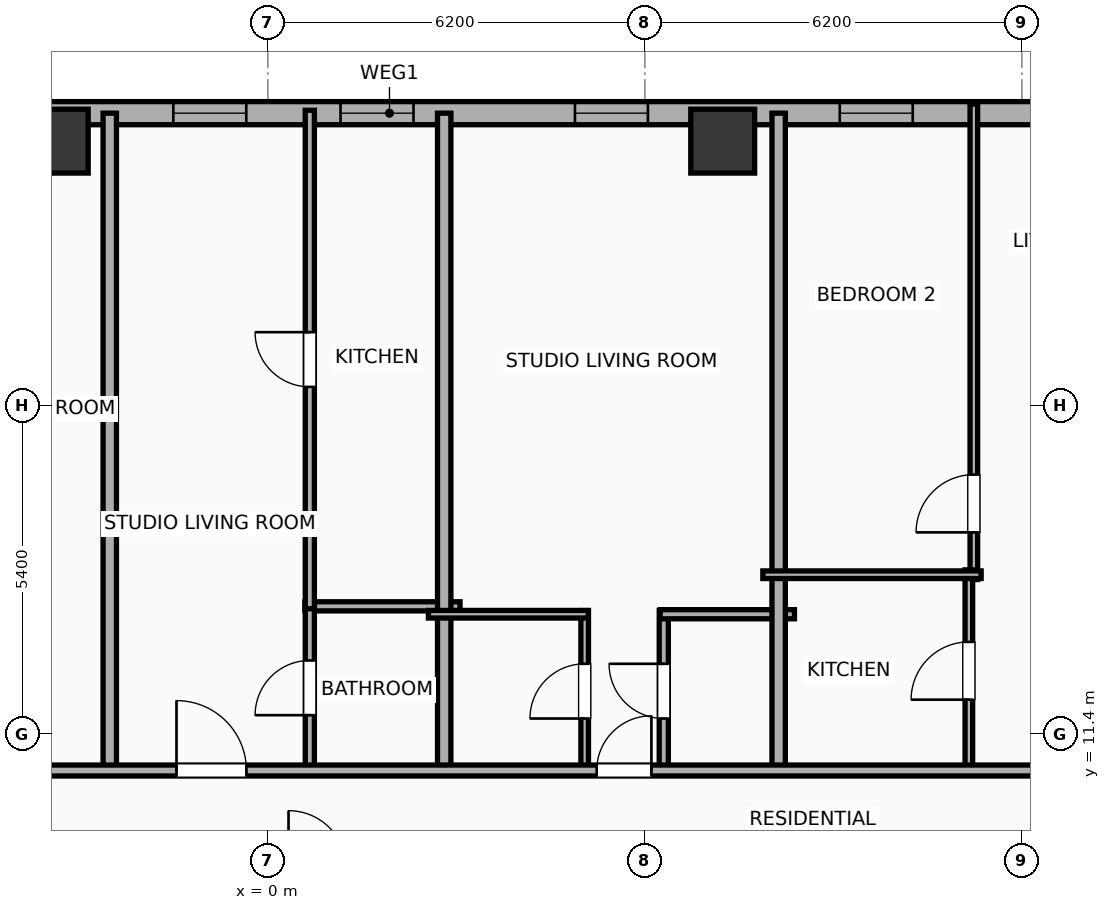
"""IFC4 building model, lengths in metres.
Left out: names, types, materials, properties, quantities, classifications, styles, units other than length and angle.
Written with IfcOpenShell. Run it as: python <this file> out.ifc"""

import sys

from ifc_helpers import new_model, si_unit, direction, frame, frame_2d, origin, origin_2d, place, context, subcontext, project, spatial, rectangle, hollow_rectangle, extrude, element, fill, save


model = new_model("IFC4")
c1 = context("Model", 3, precision=1e-05, world=origin(), true_north=direction((0.0, 1.0)))
c2 = subcontext(c1, "Body", "Model", "MODEL_VIEW")
j1 = project(units=[si_unit("LENGTHUNIT", "METRE"), si_unit("PLANEANGLEUNIT", "RADIAN")], contexts=[c1])
p1 = place(None, origin())
s1 = spatial("IfcSite", under=j1, at=p1, CompositionType="ELEMENT")
p2 = place(p1, origin())
s2 = spatial("IfcBuilding", under=s1, at=p2, CompositionType="ELEMENT")
p3 = place(p2, frame((0.0, 0.0, 109.2)))
s3 = spatial("IfcBuildingStorey", under=s2, at=p3, CompositionType="ELEMENT", Elevation=109.2)
for number, where, z_axis, x_axis in (
    (1, (7.48, 21.15, 0.0), (0.0, 0.0, 1.0), (1.0, 0.0, 0.0)),
    (2, (-3.48, 21.15, 0.0), (0.0, 0.0, 1.0), (1.0, 0.0, 0.0)),
):
    element("IfcColumn", number, at=place(p3, frame(where, z_axis=z_axis, x_axis=x_axis)), inside=s3, PredefinedType="COLUMN", context=c2, shape_type="SweptSolid", body=[
        extrude(hollow_rectangle(XDim=1.05, YDim=1.05, WallThickness=0.036, at=origin_2d()), origin(), (0.0, 0.0, 1.0), 3.9),
    ])
p4 = place(p3, frame((-25.381, 21.61, 0.0), z_axis=(0.0, 0.0, 1.0), x_axis=(1.0, 0.0, 0.0)))
e3 = element("IfcWall", 3, at=p4, inside=s3, PredefinedType="ELEMENTEDWALL", context=c2, shape_type="SweptSolid", body=[
    extrude(rectangle(XDim=54.763, YDim=0.38, at=frame_2d((27.381, 0.0))), origin(), (0.0, 0.0, 1.0), 3.65),
])
p5 = place(p4, frame((5.645, 0.0, 0.75)))
e4 = element("IfcOpeningElement", 4, at=p5, cuts=e3, PredefinedType="OPENING", context=c2, shape_type="SweptSolid", body=[
    extrude(rectangle(XDim=2.4, YDim=2.1, at=frame_2d((1.2, 1.05))), frame((0.0, 0.2, 0.0), z_axis=(0.0, -1.0, 0.0), x_axis=(1.0, 0.0, 0.0)), (0.0, 0.0, 1.0), 0.4),
])
p6 = place(p4, frame((45.067, 0.0, 0.75)))
e5 = element("IfcOpeningElement", 5, at=p6, cuts=e3, PredefinedType="OPENING", context=c2, shape_type="SweptSolid", body=[
    extrude(rectangle(XDim=2.4, YDim=2.1, at=frame_2d((1.2, 1.05))), frame((0.0, 0.2, 0.0), z_axis=(0.0, -1.0, 0.0), x_axis=(1.0, 0.0, 0.0)), (0.0, 0.0, 1.0), 0.4),
])
p7 = place(p4, frame((1.831, 0.0, 0.75)))
e6 = element("IfcOpeningElement", 6, at=p7, cuts=e3, PredefinedType="OPENING", context=c2, shape_type="SweptSolid", body=[
    extrude(rectangle(XDim=1.2, YDim=2.05, at=frame_2d((0.6, 1.025))), frame((0.0, 0.2, 0.0), z_axis=(0.0, -1.0, 0.0), x_axis=(1.0, 0.0, 0.0)), (0.0, 0.0, 1.0), 0.4),
])
p8 = place(p4, frame((8.996, 0.0, 0.75)))
e7 = element("IfcOpeningElement", 7, at=p8, cuts=e3, PredefinedType="OPENING", context=c2, shape_type="SweptSolid", body=[
    extrude(rectangle(XDim=1.2, YDim=2.05, at=frame_2d((0.6, 1.025))), frame((0.0, 0.2, 0.0), z_axis=(0.0, -1.0, 0.0), x_axis=(1.0, 0.0, 0.0)), (0.0, 0.0, 1.0), 0.4),
])
p9 = place(p4, frame((15.102, 0.0, 0.75)))
e8 = element("IfcOpeningElement", 8, at=p9, cuts=e3, PredefinedType="OPENING", context=c2, shape_type="SweptSolid", body=[
    extrude(rectangle(XDim=1.2, YDim=2.05, at=frame_2d((0.6, 1.025))), frame((0.0, 0.2, 0.0), z_axis=(0.0, -1.0, 0.0), x_axis=(1.0, 0.0, 0.0)), (0.0, 0.0, 1.0), 0.4),
])
p10 = place(p4, frame((12.352, 0.0, 0.75)))
e9 = element("IfcOpeningElement", 9, at=p10, cuts=e3, PredefinedType="OPENING", context=c2, shape_type="SweptSolid", body=[
    extrude(rectangle(XDim=1.2, YDim=2.05, at=frame_2d((0.6, 1.025))), frame((0.0, 0.2, 0.0), z_axis=(0.0, -1.0, 0.0), x_axis=(1.0, 0.0, 0.0)), (0.0, 0.0, 1.0), 0.4),
])
p11 = place(p4, frame((19.936, 0.0, 0.75)))
e10 = element("IfcOpeningElement", 10, at=p11, cuts=e3, PredefinedType="OPENING", context=c2, shape_type="SweptSolid", body=[
    extrude(rectangle(XDim=1.2, YDim=2.05, at=frame_2d((0.6, 1.025))), frame((0.0, 0.2, 0.0), z_axis=(0.0, -1.0, 0.0), x_axis=(1.0, 0.0, 0.0)), (0.0, 0.0, 1.0), 0.4),
])
p12 = place(p4, frame((17.786, 0.0, 0.75)))
e11 = element("IfcOpeningElement", 11, at=p12, cuts=e3, PredefinedType="OPENING", context=c2, shape_type="SweptSolid", body=[
    extrude(rectangle(XDim=1.2, YDim=2.05, at=frame_2d((0.6, 1.025))), frame((0.0, 0.2, 0.0), z_axis=(0.0, -1.0, 0.0), x_axis=(1.0, 0.0, 0.0)), (0.0, 0.0, 1.0), 0.4),
])
p13 = place(p4, frame((23.826, 0.0, 0.75)))
e12 = element("IfcOpeningElement", 12, at=p13, cuts=e3, PredefinedType="OPENING", context=c2, shape_type="SweptSolid", body=[
    extrude(rectangle(XDim=1.2, YDim=2.05, at=frame_2d((0.6, 1.025))), frame((0.0, 0.2, 0.0), z_axis=(0.0, -1.0, 0.0), x_axis=(1.0, 0.0, 0.0)), (0.0, 0.0, 1.0), 0.4),
])
p14 = place(p4, frame((26.576, 0.0, 0.75)))
e13 = element("IfcOpeningElement", 13, at=p14, cuts=e3, PredefinedType="OPENING", context=c2, shape_type="SweptSolid", body=[
    extrude(rectangle(XDim=1.2, YDim=2.05, at=frame_2d((0.6, 1.025))), frame((0.0, 0.2, 0.0), z_axis=(0.0, -1.0, 0.0), x_axis=(1.0, 0.0, 0.0)), (0.0, 0.0, 1.0), 0.4),
])
p15 = place(p4, frame((30.431, 0.0, 0.75)))
e14 = element("IfcOpeningElement", 14, at=p15, cuts=e3, PredefinedType="OPENING", context=c2, shape_type="SweptSolid", body=[
    extrude(rectangle(XDim=1.2, YDim=2.05, at=frame_2d((0.6, 1.025))), frame((0.0, 0.2, 0.0), z_axis=(0.0, -1.0, 0.0), x_axis=(1.0, 0.0, 0.0)), (0.0, 0.0, 1.0), 0.4),
])
p16 = place(p4, frame((38.581, 0.0, 0.75)))
e15 = element("IfcOpeningElement", 15, at=p16, cuts=e3, PredefinedType="OPENING", context=c2, shape_type="SweptSolid", body=[
    extrude(rectangle(XDim=1.2, YDim=2.05, at=frame_2d((0.6, 1.025))), frame((0.0, 0.2, 0.0), z_axis=(0.0, -1.0, 0.0), x_axis=(1.0, 0.0, 0.0)), (0.0, 0.0, 1.0), 0.4),
])
p17 = place(p4, frame((34.786, 0.0, 0.75)))
e16 = element("IfcOpeningElement", 16, at=p17, cuts=e3, PredefinedType="OPENING", context=c2, shape_type="SweptSolid", body=[
    extrude(rectangle(XDim=1.2, YDim=2.05, at=frame_2d((0.6, 1.025))), frame((0.0, 0.2, 0.0), z_axis=(0.0, -1.0, 0.0), x_axis=(1.0, 0.0, 0.0)), (0.0, 0.0, 1.0), 0.4),
])
p18 = place(p4, frame((41.876, 0.0, 0.75)))
e17 = element("IfcOpeningElement", 17, at=p18, cuts=e3, PredefinedType="OPENING", context=c2, shape_type="SweptSolid", body=[
    extrude(rectangle(XDim=1.2, YDim=2.05, at=frame_2d((0.6, 1.025))), frame((0.0, 0.2, 0.0), z_axis=(0.0, -1.0, 0.0), x_axis=(1.0, 0.0, 0.0)), (0.0, 0.0, 1.0), 0.4),
])
p19 = place(p4, frame((49.385, 0.0, 0.75)))
e18 = element("IfcOpeningElement", 18, at=p19, cuts=e3, PredefinedType="OPENING", context=c2, shape_type="SweptSolid", body=[
    extrude(rectangle(XDim=1.2, YDim=2.05, at=frame_2d((0.6, 1.025))), frame((0.0, 0.2, 0.0), z_axis=(0.0, -1.0, 0.0), x_axis=(1.0, 0.0, 0.0)), (0.0, 0.0, 1.0), 0.4),
])
p20 = place(p4, frame((52.181, 0.0, 0.75)))
e19 = element("IfcOpeningElement", 19, at=p20, cuts=e3, PredefinedType="OPENING", context=c2, shape_type="SweptSolid", body=[
    extrude(rectangle(XDim=1.2, YDim=2.05, at=frame_2d((0.6, 1.025))), frame((0.0, 0.2, 0.0), z_axis=(0.0, -1.0, 0.0), x_axis=(1.0, 0.0, 0.0)), (0.0, 0.0, 1.0), 0.4),
])
p21 = place(p3, frame((-2.6, 10.72, 0.0), z_axis=(0.0, 0.0, 1.0), x_axis=(0.0, 1.0, 0.0)))
e20 = element("IfcWall", 20, at=p21, inside=s3, PredefinedType="PARTITIONING", context=c2, shape_type="SweptSolid", body=[
    extrude(rectangle(XDim=10.89, YDim=0.22, at=frame_2d((5.445, 0.0))), origin(), (0.0, 0.0, 1.0), 3.65),
])
p22 = place(p3, frame((0.61, 13.5, 0.0), z_axis=(0.0, 0.0, 1.0), x_axis=(1.0, 0.0, 0.0)))
e21 = element("IfcWall", 21, at=p22, inside=s3, PredefinedType="PLUMBINGWALL", context=c2, shape_type="SweptSolid", body=[
    extrude(rectangle(XDim=2.55, YDim=0.15, at=frame_2d((1.275, 0.0))), origin(), (0.0, 0.0, 1.0), 3.65),
])
p23 = place(p3, frame((0.69, 10.78, 0.0), z_axis=(0.0, 0.0, 1.0), x_axis=(0.0, 1.0, 0.0)))
e22 = element("IfcWall", 22, at=p23, inside=s3, PredefinedType="PLUMBINGWALL", context=c2, shape_type="SweptSolid", body=[
    extrude(rectangle(XDim=2.76, YDim=0.15, at=frame_2d((1.38, 0.0))), origin(), (0.0, 0.0, 1.0), 3.65),
])
p24 = place(p23, frame((0.93, 0.0, 0.0)))
e23 = element("IfcOpeningElement", 23, at=p24, cuts=e22, PredefinedType="OPENING", context=c2, shape_type="SweptSolid", body=[
    extrude(rectangle(XDim=0.9, YDim=2.05, at=frame_2d((0.45, 1.025))), frame((0.0, 0.085, 0.0), z_axis=(0.0, -1.0, 0.0), x_axis=(1.0, 0.0, 0.0)), (0.0, 0.0, 1.0), 0.17),
])
p25 = place(p3, frame((0.69, 13.46, 0.0), z_axis=(0.0, 0.0, 1.0), x_axis=(0.0, 1.0, 0.0)))
e24 = element("IfcWall", 24, at=p25, inside=s3, PredefinedType="PLUMBINGWALL", context=c2, shape_type="SweptSolid", body=[
    extrude(rectangle(XDim=8.198, YDim=0.15, at=frame_2d((4.099, 0.0))), origin(), (0.0, 0.0, 1.0), 3.65),
])
p26 = place(p25, frame((3.649, 0.0, 0.0)))
e25 = element("IfcOpeningElement", 25, at=p26, cuts=e24, PredefinedType="OPENING", context=c2, shape_type="SweptSolid", body=[
    extrude(rectangle(XDim=0.9, YDim=2.05, at=frame_2d((0.45, 1.025))), frame((0.0, 0.085, 0.0), z_axis=(0.0, -1.0, 0.0), x_axis=(1.0, 0.0, 0.0)), (0.0, 0.0, 1.0), 0.17),
])
p27 = place(p3, frame((2.9, 10.72, 0.0), z_axis=(0.0, 0.0, 1.0), x_axis=(0.0, 1.0, 0.0)))
e26 = element("IfcWall", 26, at=p27, inside=s3, PredefinedType="PARTITIONING", context=c2, shape_type="SweptSolid", body=[
    extrude(rectangle(XDim=10.89, YDim=0.22, at=frame_2d((5.445, 0.0))), origin(), (0.0, 0.0, 1.0), 3.65),
])
p28 = place(p3, frame((5.21, 10.78, 0.0), z_axis=(0.0, 0.0, 1.0), x_axis=(0.0, 1.0, 0.0)))
e27 = element("IfcWall", 27, at=p28, inside=s3, PredefinedType="PARTITIONING", context=c2, shape_type="SweptSolid", body=[
    extrude(rectangle(XDim=2.65, YDim=0.125, at=frame_2d((1.325, 0.0))), origin(), (0.0, 0.0, 1.0), 3.04),
])
p29 = place(p28, frame((0.875, 0.0, 0.0)))
e28 = element("IfcOpeningElement", 28, at=p29, cuts=e27, PredefinedType="OPENING", context=c2, shape_type="SweptSolid", body=[
    extrude(rectangle(XDim=0.9, YDim=2.05, at=frame_2d((0.45, 1.025))), frame((0.0, 0.073, 0.0), z_axis=(0.0, -1.0, 0.0), x_axis=(1.0, 0.0, 0.0)), (0.0, 0.0, 1.0), 0.145),
])
p30 = place(p3, frame((6.511, 10.78, 0.0), z_axis=(0.0, 0.0, 1.0), x_axis=(0.0, 1.0, 0.0)))
e29 = element("IfcWall", 29, at=p30, inside=s3, PredefinedType="PLUMBINGWALL", context=c2, shape_type="SweptSolid", body=[
    extrude(rectangle(XDim=2.65, YDim=0.15, at=frame_2d((1.325, 0.0))), origin(), (0.0, 0.0, 1.0), 3.65),
])
p31 = place(p30, frame((0.875, 0.0, 0.0)))
e30 = element("IfcOpeningElement", 30, at=p31, cuts=e29, PredefinedType="OPENING", context=c2, shape_type="SweptSolid", body=[
    extrude(rectangle(XDim=0.9, YDim=2.05, at=frame_2d((0.45, 1.025))), frame((0.0, 0.085, 0.0), z_axis=(0.0, -1.0, 0.0), x_axis=(1.0, 0.0, 0.0)), (0.0, 0.0, 1.0), 0.17),
])
p32 = place(p3, frame((2.64, 13.37, 0.0), z_axis=(0.0, 0.0, 1.0), x_axis=(1.0, 0.0, 0.0)))
e31 = element("IfcWall", 31, at=p32, inside=s3, PredefinedType="PARTITIONING", context=c2, shape_type="SweptSolid", body=[
    extrude(rectangle(XDim=2.63, YDim=0.125, at=frame_2d((1.315, 0.0))), origin(), (0.0, 0.0, 1.0), 3.65),
])
p33 = place(p3, frame((6.451, 13.37, 0.0), z_axis=(0.0, 0.0, 1.0), x_axis=(1.0, 0.0, 0.0)))
e32 = element("IfcWall", 32, at=p33, inside=s3, PredefinedType="PLUMBINGWALL", context=c2, shape_type="SweptSolid", body=[
    extrude(rectangle(XDim=2.209, YDim=0.15, at=frame_2d((1.104, 0.0))), origin(), (0.0, 0.0, 1.0), 3.65),
])
p34 = place(p3, frame((8.4, 10.72, 0.0), z_axis=(0.0, 0.0, 1.0), x_axis=(0.0, 1.0, 0.0)))
e33 = element("IfcWall", 33, at=p34, inside=s3, PredefinedType="PARTITIONING", context=c2, shape_type="SweptSolid", body=[
    extrude(rectangle(XDim=10.89, YDim=0.22, at=frame_2d((5.445, 0.0))), origin(), (0.0, 0.0, 1.0), 3.65),
])
p35 = place(p3, frame((11.61, 13.94, 0.0), z_axis=(0.0, 0.0, 1.0), x_axis=(0.0, 1.0, 0.0)))
e34 = element("IfcWall", 34, at=p35, inside=s3, PredefinedType="PARTITIONING", context=c2, shape_type="SweptSolid", body=[
    extrude(rectangle(XDim=7.82, YDim=0.125, at=frame_2d((3.91, 0.0))), origin(), (0.0, 0.0, 1.0), 3.65),
])
p36 = place(p35, frame((0.776, 0.0, 0.0)))
e35 = element("IfcOpeningElement", 35, at=p36, cuts=e34, PredefinedType="OPENING", context=c2, shape_type="SweptSolid", body=[
    extrude(rectangle(XDim=0.95, YDim=2.05, at=frame_2d((0.475, 1.025))), frame((0.0, 0.073, 0.0), z_axis=(0.0, -1.0, 0.0), x_axis=(1.0, 0.0, 0.0)), (0.0, 0.0, 1.0), 0.145),
])
p37 = place(p3, frame((11.528, 10.78, 0.0), z_axis=(0.0, 0.0, 1.0), x_axis=(0.0, 1.0, 0.0)))
e36 = element("IfcWall", 36, at=p37, inside=s3, PredefinedType="PARTITIONING", context=c2, shape_type="SweptSolid", body=[
    extrude(rectangle(XDim=3.32, YDim=0.125, at=frame_2d((1.66, 0.0))), origin(), (0.0, 0.0, 1.0), 3.65),
])
p38 = place(p37, frame((1.185, 0.0, 0.0)))
e37 = element("IfcOpeningElement", 37, at=p38, cuts=e36, PredefinedType="OPENING", context=c2, shape_type="SweptSolid", body=[
    extrude(rectangle(XDim=0.95, YDim=2.05, at=frame_2d((0.475, 1.025))), frame((0.0, 0.073, 0.0), z_axis=(0.0, -1.0, 0.0), x_axis=(1.0, 0.0, 0.0)), (0.0, 0.0, 1.0), 0.145),
])
p39 = place(p3, frame((8.14, 14.02, 0.0), z_axis=(0.0, 0.0, 1.0), x_axis=(1.0, 0.0, 0.0)))
e38 = element("IfcWall", 38, at=p39, inside=s3, PredefinedType="PARTITIONING", context=c2, shape_type="SweptSolid", body=[
    extrude(rectangle(XDim=3.59, YDim=0.125, at=frame_2d((1.795, 0.0))), origin(), (0.0, 0.0, 1.0), 3.65),
])
p40 = place(p3, frame((-29.21, 10.8, 0.0), z_axis=(0.0, 0.0, 1.0), x_axis=(1.0, 0.0, 0.0)))
e39 = element("IfcWall", 39, at=p40, inside=s3, PredefinedType="PARTITIONING", context=c2, shape_type="SweptSolid", body=[
    extrude(rectangle(XDim=62.42, YDim=0.18, at=frame_2d((31.21, 0.0))), origin(), (0.0, 0.0, 1.0), 3.65),
])
p41 = place(p40, frame((3.457, 0.0, 0.0)))
e40 = element("IfcOpeningElement", 40, at=p41, cuts=e39, PredefinedType="OPENING", context=c2, shape_type="SweptSolid", body=[
    extrude(rectangle(XDim=1.15, YDim=2.05, at=frame_2d((0.575, 1.025))), frame((0.0, 0.1, 0.0), z_axis=(0.0, -1.0, 0.0), x_axis=(1.0, 0.0, 0.0)), (0.0, 0.0, 1.0), 0.2),
])
p42 = place(p40, frame((11.297, 0.0, 0.0)))
e41 = element("IfcOpeningElement", 41, at=p42, cuts=e39, PredefinedType="OPENING", context=c2, shape_type="SweptSolid", body=[
    extrude(rectangle(XDim=1.15, YDim=2.05, at=frame_2d((0.575, 1.025))), frame((0.0, 0.1, 0.0), z_axis=(0.0, -1.0, 0.0), x_axis=(1.0, 0.0, 0.0)), (0.0, 0.0, 1.0), 0.2),
])
p43 = place(p40, frame((18.925, 0.0, 0.0)))
e42 = element("IfcOpeningElement", 42, at=p43, cuts=e39, PredefinedType="OPENING", context=c2, shape_type="SweptSolid", body=[
    extrude(rectangle(XDim=1.15, YDim=2.05, at=frame_2d((0.575, 1.025))), frame((0.0, 0.1, 0.0), z_axis=(0.0, -1.0, 0.0), x_axis=(1.0, 0.0, 0.0)), (0.0, 0.0, 1.0), 0.2),
])
p44 = place(p40, frame((24.362, 0.0, 0.0)))
e43 = element("IfcOpeningElement", 43, at=p44, cuts=e39, PredefinedType="OPENING", context=c2, shape_type="SweptSolid", body=[
    extrude(rectangle(XDim=1.15, YDim=2.05, at=frame_2d((0.575, 1.025))), frame((0.0, 0.1, 0.0), z_axis=(0.0, -1.0, 0.0), x_axis=(1.0, 0.0, 0.0)), (0.0, 0.0, 1.0), 0.2),
])
p45 = place(p40, frame((27.708, 0.0, 0.0)))
e44 = element("IfcOpeningElement", 44, at=p45, cuts=e39, PredefinedType="OPENING", context=c2, shape_type="SweptSolid", body=[
    extrude(rectangle(XDim=1.15, YDim=2.05, at=frame_2d((0.575, 1.025))), frame((0.0, 0.1, 0.0), z_axis=(0.0, -1.0, 0.0), x_axis=(1.0, 0.0, 0.0)), (0.0, 0.0, 1.0), 0.2),
])
p46 = place(p40, frame((34.618, 0.0, 0.0)))
e45 = element("IfcOpeningElement", 45, at=p46, cuts=e39, PredefinedType="OPENING", context=c2, shape_type="SweptSolid", body=[
    extrude(rectangle(XDim=0.9, YDim=2.05, at=frame_2d((0.45, 1.025))), frame((0.0, 0.1, 0.0), z_axis=(0.0, -1.0, 0.0), x_axis=(1.0, 0.0, 0.0)), (0.0, 0.0, 1.0), 0.2),
])
p47 = place(p40, frame((43.106, 0.0, 0.0)))
e46 = element("IfcOpeningElement", 46, at=p47, cuts=e39, PredefinedType="OPENING", context=c2, shape_type="SweptSolid", body=[
    extrude(rectangle(XDim=1.15, YDim=2.05, at=frame_2d((0.575, 1.025))), frame((0.0, 0.1, 0.0), z_axis=(0.0, -1.0, 0.0), x_axis=(1.0, 0.0, 0.0)), (0.0, 0.0, 1.0), 0.2),
])
p48 = place(p40, frame((51.777, 0.0, 0.0)))
e47 = element("IfcOpeningElement", 47, at=p48, cuts=e39, PredefinedType="OPENING", context=c2, shape_type="SweptSolid", body=[
    extrude(rectangle(XDim=0.9, YDim=2.05, at=frame_2d((0.45, 1.025))), frame((0.0, 0.1, 0.0), z_axis=(0.0, -1.0, 0.0), x_axis=(1.0, 0.0, 0.0)), (0.0, 0.0, 1.0), 0.2),
])
p49 = place(p40, frame((58.718, 0.0, 0.0)))
e48 = element("IfcOpeningElement", 48, at=p49, cuts=e39, PredefinedType="OPENING", context=c2, shape_type="SweptSolid", body=[
    extrude(rectangle(XDim=0.9, YDim=2.05, at=frame_2d((0.45, 1.025))), frame((0.0, 0.1, 0.0), z_axis=(0.0, -1.0, 0.0), x_axis=(1.0, 0.0, 0.0)), (0.0, 0.0, 1.0), 0.2),
])
p50 = place(p13, origin())
e49 = element("IfcWindow", 49, at=p50, inside=s3, PartitioningType="SINGLE_PANEL", PredefinedType="WINDOW", context=c2, shape_type="SweptSolid", body=[
    extrude(rectangle(XDim=1.2, YDim=2.05, at=frame_2d((0.6, 1.025))), frame((0.0, 0.03, 0.0), z_axis=(0.0, -1.0, 0.0), x_axis=(1.0, 0.0, 0.0)), (0.0, 0.0, 1.0), 0.06),
])
fill(e12, e49)
p51 = place(p14, origin())
e50 = element("IfcWindow", 50, at=p51, inside=s3, PartitioningType="SINGLE_PANEL", PredefinedType="WINDOW", context=c2, shape_type="SweptSolid", body=[
    extrude(rectangle(XDim=1.2, YDim=2.05, at=frame_2d((0.6, 1.025))), frame((0.0, 0.03, 0.0), z_axis=(0.0, -1.0, 0.0), x_axis=(1.0, 0.0, 0.0)), (0.0, 0.0, 1.0), 0.06),
])
fill(e13, e50)
p52 = place(p15, origin())
e51 = element("IfcWindow", 51, at=p52, inside=s3, PartitioningType="SINGLE_PANEL", PredefinedType="WINDOW", context=c2, shape_type="SweptSolid", body=[
    extrude(rectangle(XDim=1.2, YDim=2.05, at=frame_2d((0.6, 1.025))), frame((0.0, 0.03, 0.0), z_axis=(0.0, -1.0, 0.0), x_axis=(1.0, 0.0, 0.0)), (0.0, 0.0, 1.0), 0.06),
])
fill(e14, e51)
p53 = place(p17, origin())
e52 = element("IfcWindow", 52, at=p53, inside=s3, PartitioningType="SINGLE_PANEL", PredefinedType="WINDOW", context=c2, shape_type="SweptSolid", body=[
    extrude(rectangle(XDim=1.2, YDim=2.05, at=frame_2d((0.6, 1.025))), frame((0.0, 0.03, 0.0), z_axis=(0.0, -1.0, 0.0), x_axis=(1.0, 0.0, 0.0)), (0.0, 0.0, 1.0), 0.06),
])
fill(e16, e52)
p54 = place(p24, origin())
e53 = element("IfcDoor", 53, at=p54, inside=s3, OperationType="SINGLE_SWING_LEFT", PredefinedType="DOOR", context=c2, shape_type="SweptSolid", body=[
    extrude(rectangle(XDim=0.9, YDim=2.05, at=frame_2d((0.45, 1.025))), frame((0.0, 0.025, 0.0), z_axis=(0.0, -1.0, 0.0), x_axis=(1.0, 0.0, 0.0)), (0.0, 0.0, 1.0), 0.05),
])
fill(e23, e53)
p55 = place(p26, origin())
e54 = element("IfcDoor", 54, at=p55, inside=s3, OperationType="SINGLE_SWING_RIGHT", PredefinedType="DOOR", context=c2, shape_type="SweptSolid", body=[
    extrude(rectangle(XDim=0.9, YDim=2.05, at=frame_2d((0.45, 1.025))), frame((0.0, 0.025, 0.0), z_axis=(0.0, -1.0, 0.0), x_axis=(1.0, 0.0, 0.0)), (0.0, 0.0, 1.0), 0.05),
])
fill(e25, e54)
p56 = place(p29, origin())
e55 = element("IfcDoor", 55, at=p56, inside=s3, OperationType="SINGLE_SWING_LEFT", PredefinedType="DOOR", context=c2, shape_type="SweptSolid", body=[
    extrude(rectangle(XDim=0.9, YDim=2.05, at=frame_2d((0.45, 1.025))), frame((0.0, 0.025, 0.0), z_axis=(0.0, -1.0, 0.0), x_axis=(1.0, 0.0, 0.0)), (0.0, 0.0, 1.0), 0.05),
])
fill(e28, e55)
p57 = place(p31, origin())
e56 = element("IfcDoor", 56, at=p57, inside=s3, OperationType="SINGLE_SWING_RIGHT", PredefinedType="DOOR", context=c2, shape_type="SweptSolid", body=[
    extrude(rectangle(XDim=0.9, YDim=2.05, at=frame_2d((0.45, 1.025))), frame((0.0, 0.025, 0.0), z_axis=(0.0, -1.0, 0.0), x_axis=(1.0, 0.0, 0.0)), (0.0, 0.0, 1.0), 0.05),
])
fill(e30, e56)
p58 = place(p36, origin())
e57 = element("IfcDoor", 57, at=p58, inside=s3, OperationType="SINGLE_SWING_LEFT", PredefinedType="DOOR", context=c2, shape_type="SweptSolid", body=[
    extrude(rectangle(XDim=0.95, YDim=2.05, at=frame_2d((0.475, 1.025))), frame((0.0, 0.025, 0.0), z_axis=(0.0, -1.0, 0.0), x_axis=(1.0, 0.0, 0.0)), (0.0, 0.0, 1.0), 0.05),
])
fill(e35, e57)
p59 = place(p38, origin())
e58 = element("IfcDoor", 58, at=p59, inside=s3, OperationType="SINGLE_SWING_LEFT", PredefinedType="DOOR", context=c2, shape_type="SweptSolid", body=[
    extrude(rectangle(XDim=0.95, YDim=2.05, at=frame_2d((0.475, 1.025))), frame((0.0, 0.025, 0.0), z_axis=(0.0, -1.0, 0.0), x_axis=(1.0, 0.0, 0.0)), (0.0, 0.0, 1.0), 0.05),
])
fill(e37, e58)
p60 = place(p45, origin())
e59 = element("IfcDoor", 59, at=p60, inside=s3, OperationType="SINGLE_SWING_LEFT", PredefinedType="DOOR", context=c2, shape_type="SweptSolid", body=[
    extrude(rectangle(XDim=1.15, YDim=2.05, at=frame_2d((0.575, 1.025))), frame((0.0, 0.025, 0.0), z_axis=(0.0, -1.0, 0.0), x_axis=(1.0, 0.0, 0.0)), (0.0, 0.0, 1.0), 0.05),
])
fill(e44, e59)
p61 = place(p46, origin())
e60 = element("IfcDoor", 60, at=p61, inside=s3, OperationType="SINGLE_SWING_RIGHT", PredefinedType="DOOR", context=c2, shape_type="SweptSolid", body=[
    extrude(rectangle(XDim=0.9, YDim=2.05, at=frame_2d((0.45, 1.025))), frame((0.0, 0.025, 0.0), z_axis=(0.0, -1.0, 0.0), x_axis=(1.0, 0.0, 0.0)), (0.0, 0.0, 1.0), 0.05),
])
fill(e45, e60)
save(model, sys.argv[1])
